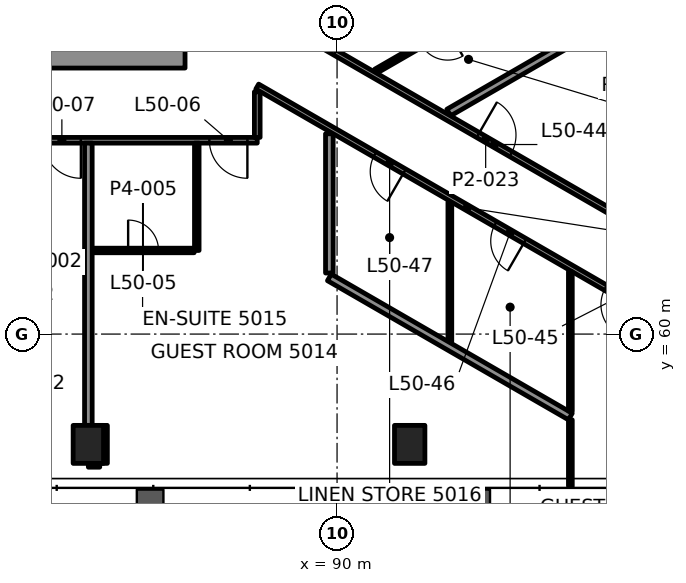
"""IFC4 building model, lengths in metres.
Left out: names, types, materials, properties, quantities, classifications, styles, units other than length and angle.
Written with IfcOpenShell. Run it as: python <this file> out.ifc"""

import sys

from ifc_helpers import new_model, si_unit, direction, frame, frame_2d, origin, origin_2d, place, context, subcontext, project, spatial, rectangle, hollow_rectangle, extrude, element, fill, save


model = new_model("IFC4")
c1 = context("Model", 3, precision=1e-05, world=origin(), true_north=direction((0.0, 1.0)))
c2 = subcontext(c1, "Body", "Model", "MODEL_VIEW")
j1 = project(units=[si_unit("LENGTHUNIT", "METRE"), si_unit("PLANEANGLEUNIT", "RADIAN")], contexts=[c1])
p1 = place(None, origin())
s1 = spatial("IfcSite", under=j1, at=p1, CompositionType="ELEMENT")
p2 = place(p1, origin())
s2 = spatial("IfcBuilding", under=s1, at=p2, CompositionType="ELEMENT")
p3 = place(p2, frame((0.0, 0.0, 214.3)))
s3 = spatial("IfcBuildingStorey", under=s2, at=p3, CompositionType="ELEMENT", Elevation=214.3)
for number, where, z_axis, x_axis in (
    (1, (83.456, 57.097, -0.0), (0.0, 0.0, 1.0), (1.0, 0.0, 0.0)),
    (2, (91.911, 57.097, -0.0), (0.0, 0.0, 1.0), (1.0, 0.0, 0.0)),
):
    element("IfcColumn", number, at=place(p3, frame(where, z_axis=z_axis, x_axis=x_axis)), inside=s3, PredefinedType="COLUMN", context=c2, shape_type="SweptSolid", body=[
        extrude(hollow_rectangle(XDim=0.8, YDim=1.0, WallThickness=0.05, at=origin_2d()), origin(), (0.0, 0.0, 1.0), 3.9),
    ])
p4 = place(p3, frame((64.0, 67.375, 0.0), z_axis=(0.0, 0.0, 1.0), x_axis=(1.0, 0.0, 0.0)))
e3 = element("IfcWall", 3, at=p4, inside=s3, PredefinedType="SHEAR", context=c2, shape_type="SweptSolid", body=[
    extrude(rectangle(XDim=22.0, YDim=0.75, at=frame_2d((11.0, 0.0))), origin(), (0.0, 0.0, 1.0), 3.7),
])
p5 = place(p4, frame((1.575, 0.0, 0.0)))
e4 = element("IfcOpeningElement", 4, at=p5, cuts=e3, PredefinedType="OPENING", context=c2, shape_type="SweptSolid", body=[
    extrude(rectangle(XDim=0.9, YDim=2.1, at=frame_2d((0.45, 1.05))), frame((0.0, 0.385, 0.0), z_axis=(0.0, -1.0, 0.0), x_axis=(1.0, 0.0, 0.0)), (0.0, 0.0, 1.0), 0.77),
])
p6 = place(p4, frame((4.425, 0.0, 0.0)))
e5 = element("IfcOpeningElement", 5, at=p6, cuts=e3, PredefinedType="OPENING", context=c2, shape_type="SweptSolid", body=[
    extrude(rectangle(XDim=0.9, YDim=2.1, at=frame_2d((0.45, 1.05))), frame((0.0, 0.385, 0.0), z_axis=(0.0, -1.0, 0.0), x_axis=(1.0, 0.0, 0.0)), (0.0, 0.0, 1.0), 0.77),
])
p7 = place(p3, frame((83.456, 56.597, 0.0), z_axis=(0.0, 0.0, 1.0), x_axis=(1.0, 0.0, 0.0)))
e6 = element("IfcWall", 6, at=p7, inside=s3, PredefinedType="PARTITIONING", context=c2, shape_type="SweptSolid", body=[
    extrude(rectangle(XDim=0.3, YDim=0.2, at=frame_2d((0.15, 0.0))), origin(), (0.0, 0.0, 1.0), 3.1),
])
p8 = place(p3, frame((83.566, 62.2, 0.0), z_axis=(0.0, 0.0, 1.0), x_axis=(1.0, 0.0, 0.0)))
e7 = element("IfcWall", 7, at=p8, inside=s3, PredefinedType="PARTITIONING", context=c2, shape_type="SweptSolid", body=[
    extrude(rectangle(XDim=2.674, YDim=0.12, at=frame_2d((1.337, 0.0))), origin(), (0.0, 0.0, 1.0), 3.1),
])
p9 = place(p8, frame((0.937, 0.0, 0.0)))
e8 = element("IfcOpeningElement", 8, at=p9, cuts=e7, PredefinedType="OPENING", context=c2, shape_type="SweptSolid", body=[
    extrude(rectangle(XDim=0.8, YDim=2.1, at=frame_2d((0.4, 1.05))), frame((0.0, 0.07, 0.0), z_axis=(0.0, -1.0, 0.0), x_axis=(1.0, 0.0, 0.0)), (0.0, 0.0, 1.0), 0.14),
])
p10 = place(p3, frame((87.899, 65.1, 0.0), z_axis=(0.0, 0.0, 1.0), x_axis=(-1.0, 0.0, 0.0)))
e9 = element("IfcWall", 9, at=p10, inside=s3, PredefinedType="PARTITIONING", context=c2, shape_type="SweptSolid", body=[
    extrude(rectangle(XDim=25.799, YDim=0.15, at=frame_2d((12.899, 0.0))), origin(), (0.0, 0.0, 1.0), 3.1),
])
p11 = place(p10, frame((0.259, 0.0, 0.0)))
e10 = element("IfcOpeningElement", 10, at=p11, cuts=e9, PredefinedType="OPENING", context=c2, shape_type="SweptSolid", body=[
    extrude(rectangle(XDim=1.0, YDim=2.1, at=frame_2d((0.5, 1.05))), frame((0.0, 0.085, 0.0), z_axis=(0.0, -1.0, 0.0), x_axis=(1.0, 0.0, 0.0)), (0.0, 0.0, 1.0), 0.17),
])
p12 = place(p10, frame((4.641, 0.0, 0.0)))
e11 = element("IfcOpeningElement", 11, at=p12, cuts=e9, PredefinedType="OPENING", context=c2, shape_type="SweptSolid", body=[
    extrude(rectangle(XDim=1.0, YDim=2.1, at=frame_2d((0.5, 1.05))), frame((0.0, 0.085, 0.0), z_axis=(0.0, -1.0, 0.0), x_axis=(1.0, 0.0, 0.0)), (0.0, 0.0, 1.0), 0.17),
])
p13 = place(p10, frame((8.868, 0.0, 0.0)))
e12 = element("IfcOpeningElement", 12, at=p13, cuts=e9, PredefinedType="OPENING", context=c2, shape_type="SweptSolid", body=[
    extrude(rectangle(XDim=1.0, YDim=2.1, at=frame_2d((0.5, 1.05))), frame((0.0, 0.085, 0.0), z_axis=(0.0, -1.0, 0.0), x_axis=(1.0, 0.0, 0.0)), (0.0, 0.0, 1.0), 0.17),
])
p14 = place(p10, frame((13.271, 0.0, 0.0)))
e13 = element("IfcOpeningElement", 13, at=p14, cuts=e9, PredefinedType="OPENING", context=c2, shape_type="SweptSolid", body=[
    extrude(rectangle(XDim=1.0, YDim=2.1, at=frame_2d((0.5, 1.05))), frame((0.0, 0.085, 0.0), z_axis=(0.0, -1.0, 0.0), x_axis=(1.0, 0.0, 0.0)), (0.0, 0.0, 1.0), 0.17),
])
p15 = place(p10, frame((19.612, 0.0, 0.0)))
e14 = element("IfcOpeningElement", 14, at=p15, cuts=e9, PredefinedType="OPENING", context=c2, shape_type="SweptSolid", body=[
    extrude(rectangle(XDim=1.0, YDim=2.1, at=frame_2d((0.5, 1.05))), frame((0.0, 0.085, 0.0), z_axis=(0.0, -1.0, 0.0), x_axis=(1.0, 0.0, 0.0)), (0.0, 0.0, 1.0), 0.17),
])
p16 = place(p3, frame((92.938, 65.83, 0.0), z_axis=(0.0, 0.0, 1.0), x_axis=(0.866041300655, 0.499972464802, 0.0)))
e15 = element("IfcWall", 15, at=p16, inside=s3, PredefinedType="PARTITIONING", context=c2, shape_type="SweptSolid", body=[
    extrude(rectangle(XDim=6.452, YDim=0.2, at=frame_2d((3.226, 0.0))), origin(), (0.0, 0.0, 1.0), 3.1),
])
p17 = place(p3, frame((94.109, 68.702, 0.0), z_axis=(0.0, 0.0, 1.0), x_axis=(-0.866028357664, -0.499994883695, 0.0)))
e16 = element("IfcWall", 16, at=p17, inside=s3, PredefinedType="PARTITIONING", context=c2, shape_type="SweptSolid", body=[
    extrude(rectangle(XDim=3.568, YDim=0.12, at=frame_2d((1.784, 0.0))), origin(), (0.0, 0.0, 1.0), 3.1),
])
p18 = place(p17, frame((1.384, 0.0, 0.0)))
e17 = element("IfcOpeningElement", 17, at=p18, cuts=e16, PredefinedType="OPENING", context=c2, shape_type="SweptSolid", body=[
    extrude(rectangle(XDim=0.8, YDim=2.1, at=frame_2d((0.4, 1.05))), frame((0.0, 0.07, 0.0), z_axis=(0.0, -1.0, 0.0), x_axis=(1.0, 0.0, 0.0)), (0.0, 0.0, 1.0), 0.14),
])
p19 = place(p3, frame((96.139, 55.998, 0.0), z_axis=(0.0, 0.0, 1.0), x_axis=(0.0, 1.0, 0.0)))
e18 = element("IfcWall", 18, at=p19, inside=s3, PredefinedType="PARTITIONING", context=c2, shape_type="SweptSolid", body=[
    extrude(rectangle(XDim=1.746, YDim=0.1, at=frame_2d((0.873, 0.0))), origin(), (0.0, 0.0, 1.0), 3.1),
])
p20 = place(p3, frame((92.968, 59.806, 0.0), z_axis=(0.0, 0.0, 1.0), x_axis=(0.0, 1.0, 0.0)))
e19 = element("IfcWall", 19, at=p20, inside=s3, PredefinedType="PARTITIONING", context=c2, shape_type="SweptSolid", body=[
    extrude(rectangle(XDim=3.664, YDim=0.1, at=frame_2d((1.832, 0.0))), origin(), (0.0, 0.0, 1.0), 3.1),
])
p21 = place(p3, frame((89.797, 61.607, 0.0), z_axis=(0.0, 0.0, 1.0), x_axis=(0.0, 1.0, 0.0)))
e20 = element("IfcWall", 20, at=p21, inside=s3, PredefinedType="PARTITIONING", context=c2, shape_type="SweptSolid", body=[
    extrude(rectangle(XDim=3.664, YDim=0.2, at=frame_2d((1.832, 0.0))), origin(), (0.0, 0.0, 1.0), 2.947),
])
p22 = place(p3, frame((87.9, 65.176, 0.0), z_axis=(0.0, 0.0, 1.0), x_axis=(0.0, 1.0, 0.0)))
e21 = element("IfcWall", 21, at=p22, inside=s3, PredefinedType="PARTITIONING", context=c2, shape_type="SweptSolid", body=[
    extrude(rectangle(XDim=1.201, YDim=0.15, at=frame_2d((0.6, 0.0))), origin(), (0.0, 0.0, 1.0), 2.947),
])
p23 = place(p3, frame((86.309, 62.2, 0.0), z_axis=(0.0, 0.0, 1.0), x_axis=(0.0, 1.0, 0.0)))
e22 = element("IfcWall", 22, at=p23, inside=s3, PredefinedType="PARTITIONING", context=c2, shape_type="SweptSolid", body=[
    extrude(rectangle(XDim=2.825, YDim=0.12, at=frame_2d((1.413, 0.0))), origin(), (0.0, 0.0, 1.0), 3.1),
])
p24 = place(p3, frame((83.856, 56.598, 0.0), z_axis=(0.0, 0.0, 1.0), x_axis=(0.0, 1.0, 0.0)))
e23 = element("IfcWall", 23, at=p24, inside=s3, PredefinedType="PARTITIONING", context=c2, shape_type="SweptSolid", body=[
    extrude(rectangle(XDim=0.999, YDim=0.2, at=frame_2d((0.5, 0.0))), origin(), (0.0, 0.0, 1.0), 3.022),
])
p25 = place(p3, frame((83.456, 57.597, 0.0), z_axis=(0.0, 0.0, 1.0), x_axis=(0.0, 1.0, 0.0)))
e24 = element("IfcWall", 24, at=p25, inside=s3, PredefinedType="PARTITIONING", context=c2, shape_type="SweptSolid", body=[
    extrude(rectangle(XDim=7.427, YDim=0.2, at=frame_2d((3.714, 0.0))), origin(), (0.0, 0.0, 1.0), 3.1),
])
p26 = place(p3, frame((87.975, 68.548, 0.0), z_axis=(0.0, 0.0, 1.0), x_axis=(0.866024823711, -0.500001004715, 0.0)))
e25 = element("IfcWall", 25, at=p26, inside=s3, PredefinedType="PARTITIONING", context=c2, shape_type="SweptSolid", body=[
    extrude(rectangle(XDim=13.707, YDim=0.15, at=frame_2d((6.854, 0.0))), origin(), (0.0, 0.0, 1.0), 3.1),
])
p27 = place(p26, frame((1.283, 0.0, 0.0)))
e26 = element("IfcOpeningElement", 26, at=p27, cuts=e25, PredefinedType="OPENING", context=c2, shape_type="SweptSolid", body=[
    extrude(rectangle(XDim=1.0, YDim=2.1, at=frame_2d((0.5, 1.05))), frame((0.0, 0.085, 0.0), z_axis=(0.0, -1.0, 0.0), x_axis=(1.0, 0.0, 0.0)), (0.0, 0.0, 1.0), 0.17),
])
p28 = place(p26, frame((6.62, 0.0, 0.0)))
e27 = element("IfcOpeningElement", 27, at=p28, cuts=e25, PredefinedType="OPENING", context=c2, shape_type="SweptSolid", body=[
    extrude(rectangle(XDim=1.0, YDim=2.1, at=frame_2d((0.5, 1.05))), frame((0.0, 0.085, 0.0), z_axis=(0.0, -1.0, 0.0), x_axis=(1.0, 0.0, 0.0)), (0.0, 0.0, 1.0), 0.17),
])
p29 = place(p3, frame((98.945, 60.136, 0.0), z_axis=(0.0, 0.0, 1.0), x_axis=(-0.866024604137, 0.500001385028, 0.0)))
e28 = element("IfcWall", 28, at=p29, inside=s3, PredefinedType="PARTITIONING", context=c2, shape_type="SweptSolid", body=[
    extrude(rectangle(XDim=12.754, YDim=0.15, at=frame_2d((6.377, 0.0))), origin(), (0.0, 0.0, 1.0), 2.947),
])
p30 = place(p29, frame((1.271, 0.0, 0.0)))
e29 = element("IfcOpeningElement", 29, at=p30, cuts=e28, PredefinedType="OPENING", context=c2, shape_type="SweptSolid", body=[
    extrude(rectangle(XDim=0.9, YDim=2.1, at=frame_2d((0.45, 1.05))), frame((0.0, 0.085, 0.0), z_axis=(0.0, -1.0, 0.0), x_axis=(1.0, 0.0, 0.0)), (0.0, 0.0, 1.0), 0.17),
])
p31 = place(p29, frame((4.621, 0.0, 0.0)))
e30 = element("IfcOpeningElement", 30, at=p31, cuts=e28, PredefinedType="OPENING", context=c2, shape_type="SweptSolid", body=[
    extrude(rectangle(XDim=0.9, YDim=2.1, at=frame_2d((0.45, 1.05))), frame((0.0, 0.085, 0.0), z_axis=(0.0, -1.0, 0.0), x_axis=(1.0, 0.0, 0.0)), (0.0, 0.0, 1.0), 0.17),
])
p32 = place(p29, frame((8.282, 0.0, 0.0)))
e31 = element("IfcOpeningElement", 31, at=p32, cuts=e28, PredefinedType="OPENING", context=c2, shape_type="SweptSolid", body=[
    extrude(rectangle(XDim=0.9, YDim=2.1, at=frame_2d((0.45, 1.05))), frame((0.0, 0.085, 0.0), z_axis=(0.0, -1.0, 0.0), x_axis=(1.0, 0.0, 0.0)), (0.0, 0.0, 1.0), 0.17),
])
p33 = place(p3, frame((96.139, 57.83, 0.0), z_axis=(0.0, 0.0, 1.0), x_axis=(-0.866014584968, 0.500018738272, 0.0)))
e32 = element("IfcWall", 32, at=p33, inside=s3, PredefinedType="PARTITIONING", context=c2, shape_type="SweptSolid", body=[
    extrude(rectangle(XDim=7.323, YDim=0.2, at=frame_2d((3.662, 0.0))), origin(), (0.0, 0.0, 1.0), 3.1),
])
p34 = place(p3, frame((96.139, 57.975, 0.0), z_axis=(0.0, 0.0, 1.0), x_axis=(0.0, 1.0, 0.0)))
e33 = element("IfcWall", 33, at=p34, inside=s3, PredefinedType="PARTITIONING", context=c2, shape_type="SweptSolid", body=[
    extrude(rectangle(XDim=3.665, YDim=0.1, at=frame_2d((1.833, 0.0))), origin(), (0.0, 0.0, 1.0), 3.1),
])
p35 = place(p9, origin())
e34 = element("IfcDoor", 34, at=p35, inside=s3, OperationType="SINGLE_SWING_RIGHT", PredefinedType="DOOR", context=c2, shape_type="SweptSolid", body=[
    extrude(rectangle(XDim=0.8, YDim=2.1, at=frame_2d((0.4, 1.05))), frame((0.0, 0.025, 0.0), z_axis=(0.0, -1.0, 0.0), x_axis=(1.0, 0.0, 0.0)), (0.0, 0.0, 1.0), 0.05),
])
fill(e8, e34)
p36 = place(p11, origin())
e35 = element("IfcDoor", 35, at=p36, inside=s3, OperationType="SINGLE_SWING_RIGHT", PredefinedType="DOOR", context=c2, shape_type="SweptSolid", body=[
    extrude(rectangle(XDim=1.0, YDim=2.1, at=frame_2d((0.5, 1.05))), frame((0.0, 0.025, 0.0), z_axis=(0.0, -1.0, 0.0), x_axis=(1.0, 0.0, 0.0)), (0.0, 0.0, 1.0), 0.05),
])
fill(e10, e35)
p37 = place(p12, origin())
e36 = element("IfcDoor", 36, at=p37, inside=s3, OperationType="SINGLE_SWING_RIGHT", PredefinedType="DOOR", context=c2, shape_type="SweptSolid", body=[
    extrude(rectangle(XDim=1.0, YDim=2.1, at=frame_2d((0.5, 1.05))), frame((0.0, 0.025, 0.0), z_axis=(0.0, -1.0, 0.0), x_axis=(1.0, 0.0, 0.0)), (0.0, 0.0, 1.0), 0.05),
])
fill(e11, e36)
p38 = place(p27, origin())
e37 = element("IfcDoor", 37, at=p38, inside=s3, OperationType="SINGLE_SWING_LEFT", PredefinedType="DOOR", context=c2, shape_type="SweptSolid", body=[
    extrude(rectangle(XDim=1.0, YDim=2.1, at=frame_2d((0.5, 1.05))), frame((0.0, 0.025, 0.0), z_axis=(0.0, -1.0, 0.0), x_axis=(1.0, 0.0, 0.0)), (0.0, 0.0, 1.0), 0.05),
])
fill(e26, e37)
p39 = place(p28, origin())
e38 = element("IfcDoor", 38, at=p39, inside=s3, OperationType="SINGLE_SWING_LEFT", PredefinedType="DOOR", context=c2, shape_type="SweptSolid", body=[
    extrude(rectangle(XDim=1.0, YDim=2.1, at=frame_2d((0.5, 1.05))), frame((0.0, 0.025, 0.0), z_axis=(0.0, -1.0, 0.0), x_axis=(1.0, 0.0, 0.0)), (0.0, 0.0, 1.0), 0.05),
])
fill(e27, e38)
p40 = place(p30, origin())
e39 = element("IfcDoor", 39, at=p40, inside=s3, OperationType="SINGLE_SWING_LEFT", PredefinedType="DOOR", context=c2, shape_type="SweptSolid", body=[
    extrude(rectangle(XDim=0.9, YDim=2.1, at=frame_2d((0.45, 1.05))), frame((0.0, 0.025, 0.0), z_axis=(0.0, -1.0, 0.0), x_axis=(1.0, 0.0, 0.0)), (0.0, 0.0, 1.0), 0.05),
])
fill(e29, e39)
p41 = place(p31, origin())
e40 = element("IfcDoor", 40, at=p41, inside=s3, OperationType="SINGLE_SWING_RIGHT", PredefinedType="DOOR", context=c2, shape_type="SweptSolid", body=[
    extrude(rectangle(XDim=0.9, YDim=2.1, at=frame_2d((0.45, 1.05))), frame((0.0, 0.025, 0.0), z_axis=(0.0, -1.0, 0.0), x_axis=(1.0, 0.0, 0.0)), (0.0, 0.0, 1.0), 0.05),
])
fill(e30, e40)
p42 = place(p32, origin())
e41 = element("IfcDoor", 41, at=p42, inside=s3, OperationType="SINGLE_SWING_LEFT", PredefinedType="DOOR", context=c2, shape_type="SweptSolid", body=[
    extrude(rectangle(XDim=0.9, YDim=2.1, at=frame_2d((0.45, 1.05))), frame((0.0, 0.025, 0.0), z_axis=(0.0, -1.0, 0.0), x_axis=(1.0, 0.0, 0.0)), (0.0, 0.0, 1.0), 0.05),
])
fill(e31, e41)
p43 = place(p3, origin())
p44 = place(p43, frame((86.333, 55.952, 0.15), z_axis=(0.0, 0.0, 1.0), x_axis=(1.0, 0.0, 0.0)))
p45 = place(p44, origin())
e42 = element("IfcWindow", 42, at=p45, inside=s3, PartitioningType="SINGLE_PANEL", PredefinedType="WINDOW", context=c2, shape_type="SweptSolid", body=[
    extrude(rectangle(XDim=2.743, YDim=3.55, at=frame_2d((1.372, 1.775))), frame((0.0, 0.03, 0.0), z_axis=(0.0, -1.0, 0.0), x_axis=(1.0, 0.0, 0.0)), (0.0, 0.0, 1.0), 0.06),
])
save(model, sys.argv[1])
